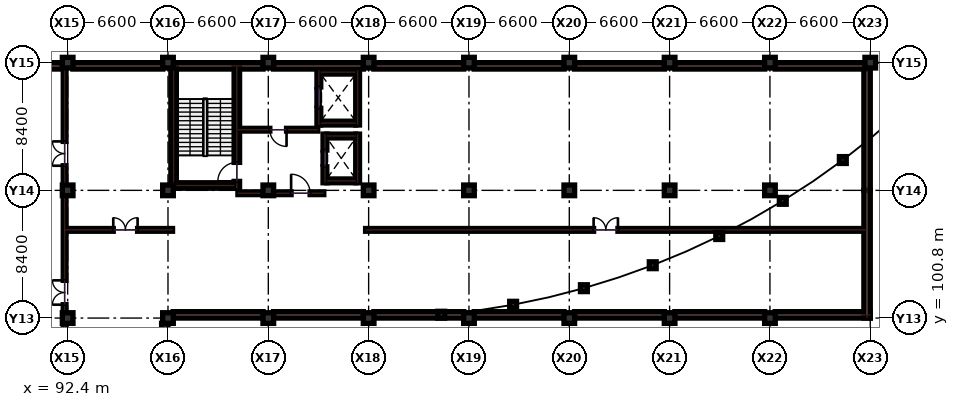
"""IFC4 building model, lengths in metres.
Left out: names, types, materials, properties, quantities, classifications, styles, units other than length and angle.
Written with IfcOpenShell. Run it as: python <this file> out.ifc"""

import sys

from ifc_helpers import new_model, si_unit, direction, frame, frame_2d, origin, origin_2d, place, context, subcontext, project, spatial, rectangle, extrude, element, fill, save


model = new_model("IFC4")
c1 = context("Model", 3, precision=1e-05, world=origin(), true_north=direction((0.0, 1.0)))
c2 = subcontext(c1, "Body", "Model", "MODEL_VIEW")
j1 = project(units=[si_unit("LENGTHUNIT", "METRE"), si_unit("PLANEANGLEUNIT", "RADIAN")], contexts=[c1])
p1 = place(None, origin())
s1 = spatial("IfcSite", under=j1, at=p1, CompositionType="ELEMENT")
p2 = place(p1, origin())
s2 = spatial("IfcBuilding", under=s1, at=p2, CompositionType="ELEMENT")
p3 = place(p2, frame((0.0, 0.0, -4.5)))
s3 = spatial("IfcBuildingStorey", under=s2, at=p3, CompositionType="ELEMENT", Elevation=-4.5)
for number, where, z_axis, x_axis in (
    (1, (92.4, 100.8, 0.0), (0.0, 0.0, 1.0), (1.0, 0.0, 0.0)),
    (2, (92.4, 109.2, 0.0), (0.0, 0.0, 1.0), (1.0, 0.0, 0.0)),
    (3, (92.4, 117.6, 0.0), (0.0, 0.0, 1.0), (1.0, 0.0, 0.0)),
    (4, (99.0, 100.8, 0.0), (0.0, 0.0, 1.0), (1.0, 0.0, 0.0)),
    (5, (99.0, 109.2, 0.0), (0.0, 0.0, 1.0), (1.0, 0.0, 0.0)),
    (6, (99.0, 117.6, 0.0), (0.0, 0.0, 1.0), (1.0, 0.0, 0.0)),
    (7, (105.6, 100.8, 0.0), (0.0, 0.0, 1.0), (1.0, 0.0, 0.0)),
    (8, (105.6, 109.2, 0.0), (0.0, 0.0, 1.0), (1.0, 0.0, 0.0)),
    (9, (105.6, 117.6, 0.0), (0.0, 0.0, 1.0), (1.0, 0.0, 0.0)),
    (10, (112.2, 100.8, 0.0), (0.0, 0.0, 1.0), (1.0, 0.0, 0.0)),
    (11, (112.2, 109.2, 0.0), (0.0, 0.0, 1.0), (1.0, 0.0, 0.0)),
    (12, (112.2, 117.6, 0.0), (0.0, 0.0, 1.0), (1.0, 0.0, 0.0)),
    (13, (118.8, 100.8, 0.0), (0.0, 0.0, 1.0), (1.0, 0.0, 0.0)),
    (14, (118.8, 109.2, 0.0), (0.0, 0.0, 1.0), (1.0, 0.0, 0.0)),
    (15, (118.8, 117.6, 0.0), (0.0, 0.0, 1.0), (1.0, 0.0, 0.0)),
    (16, (125.4, 100.8, 0.0), (0.0, 0.0, 1.0), (1.0, 0.0, 0.0)),
    (17, (125.4, 109.2, 0.0), (0.0, 0.0, 1.0), (1.0, 0.0, 0.0)),
    (18, (125.4, 117.6, 0.0), (0.0, 0.0, 1.0), (1.0, 0.0, 0.0)),
    (19, (132.0, 100.8, 0.0), (0.0, 0.0, 1.0), (1.0, 0.0, 0.0)),
    (20, (132.0, 109.2, 0.0), (0.0, 0.0, 1.0), (1.0, 0.0, 0.0)),
    (21, (132.0, 117.6, 0.0), (0.0, 0.0, 1.0), (1.0, 0.0, 0.0)),
    (22, (138.6, 100.8, 0.0), (0.0, 0.0, 1.0), (1.0, 0.0, 0.0)),
    (23, (138.6, 109.2, 0.0), (0.0, 0.0, 1.0), (1.0, 0.0, 0.0)),
    (24, (138.6, 117.6, 0.0), (0.0, 0.0, 1.0), (1.0, 0.0, 0.0)),
    (25, (145.2, 117.6, 0.0), (0.0, 0.0, 1.0), (1.0, 0.0, 0.0)),
):
    element("IfcColumn", number, at=place(p3, frame(where, z_axis=z_axis, x_axis=x_axis)), inside=s3, PredefinedType="COLUMN", context=c2, shape_type="SweptSolid", body=[
        extrude(rectangle(XDim=0.7, YDim=0.7, at=origin_2d()), origin(), (0.0, 0.0, 1.0), 4.5),
    ])
for number, where, z_axis, x_axis in (
    (26, (116.975, 101.02, 0.0), (0.0, 0.0, 1.0), (1.0, 0.0, 0.0)),
    (27, (121.705, 101.675, 0.0), (0.0, 0.0, 1.0), (1.0, 0.0, 0.0)),
    (28, (126.36, 102.765, 0.0), (0.0, 0.0, 1.0), (1.0, 0.0, 0.0)),
    (29, (130.89, 104.275, 0.0), (0.0, 0.0, 1.0), (1.0, 0.0, 0.0)),
    (30, (135.265, 106.195, 0.0), (0.0, 0.0, 1.0), (1.0, 0.0, 0.0)),
    (31, (139.445, 108.51, 0.0), (0.0, 0.0, 1.0), (1.0, 0.0, 0.0)),
    (32, (143.395, 111.195, 0.0), (0.0, 0.0, 1.0), (1.0, 0.0, 0.0)),
):
    element("IfcColumn", number, at=place(p3, frame(where, z_axis=z_axis, x_axis=x_axis)), inside=s3, PredefinedType="COLUMN", context=c2, shape_type="SweptSolid", body=[
        extrude(rectangle(XDim=0.45, YDim=0.45, at=origin_2d()), origin(), (0.0, 0.0, 1.0), 4.5),
    ])
p4 = place(p3, frame((92.2, 92.82, 0.0), z_axis=(0.0, 0.0, 1.0), x_axis=(0.0, 1.0, 0.0)))
e33 = element("IfcWall", 33, at=p4, inside=s3, PredefinedType="SOLIDWALL", context=c2, shape_type="SweptSolid", body=[
    extrude(rectangle(XDim=7.53, YDim=0.18, at=frame_2d((3.765, 0.0))), origin(), (0.0, 0.0, 1.0), 3.29),
])
p5 = place(p4, frame((5.58, 0.0, 0.0)))
e34 = element("IfcOpeningElement", 34, at=p5, cuts=e33, PredefinedType="OPENING", context=c2, shape_type="SweptSolid", body=[
    extrude(rectangle(XDim=1.6, YDim=2.2, at=frame_2d((0.8, 1.1))), frame((0.0, 0.1, 0.0), z_axis=(0.0, -1.0, 0.0), x_axis=(1.0, 0.0, 0.0)), (0.0, 0.0, 1.0), 0.2),
])
p6 = place(p3, frame((92.2, 101.25, 0.0), z_axis=(0.0, 0.0, 1.0), x_axis=(0.0, 1.0, 0.0)))
e35 = element("IfcWall", 35, at=p6, inside=s3, PredefinedType="SOLIDWALL", context=c2, shape_type="SweptSolid", body=[
    extrude(rectangle(XDim=7.5, YDim=0.18, at=frame_2d((3.75, 0.0))), origin(), (0.0, 0.0, 1.0), 3.29),
])
p7 = place(p6, frame((0.43, 0.0, 0.0)))
e36 = element("IfcOpeningElement", 36, at=p7, cuts=e35, PredefinedType="OPENING", context=c2, shape_type="SweptSolid", body=[
    extrude(rectangle(XDim=1.6, YDim=2.2, at=frame_2d((0.8, 1.1))), frame((0.0, 0.1, 0.0), z_axis=(0.0, -1.0, 0.0), x_axis=(1.0, 0.0, 0.0)), (0.0, 0.0, 1.0), 0.2),
])
p8 = place(p3, frame((92.2, 109.65, 0.0), z_axis=(0.0, 0.0, 1.0), x_axis=(0.0, 1.0, 0.0)))
e37 = element("IfcWall", 37, at=p8, inside=s3, PredefinedType="SOLIDWALL", context=c2, shape_type="SweptSolid", body=[
    extrude(rectangle(XDim=7.65, YDim=0.18, at=frame_2d((3.825, 0.0))), origin(), (0.0, 0.0, 1.0), 3.29),
])
p9 = place(p8, frame((1.17, 0.0, 0.0)))
e38 = element("IfcOpeningElement", 38, at=p9, cuts=e37, PredefinedType="OPENING", context=c2, shape_type="SweptSolid", body=[
    extrude(rectangle(XDim=1.6, YDim=2.2, at=frame_2d((0.8, 1.1))), frame((0.0, 0.1, 0.0), z_axis=(0.0, -1.0, 0.0), x_axis=(1.0, 0.0, 0.0)), (0.0, 0.0, 1.0), 0.2),
])
p10 = place(p3, frame((92.2, 106.6, 0.0), z_axis=(0.0, 0.0, 1.0), x_axis=(1.0, 0.0, 0.0)))
e39 = element("IfcWall", 39, at=p10, inside=s3, PredefinedType="SOLIDWALL", context=c2, shape_type="SweptSolid", body=[
    extrude(rectangle(XDim=7.1, YDim=0.18, at=frame_2d((3.55, 0.0))), origin(), (0.0, 0.0, 1.0), 3.29),
])
p11 = place(p10, frame((3.2, 0.0, 0.0)))
e40 = element("IfcOpeningElement", 40, at=p11, cuts=e39, PredefinedType="OPENING", context=c2, shape_type="SweptSolid", body=[
    extrude(rectangle(XDim=1.6, YDim=2.2, at=frame_2d((0.8, 1.1))), frame((0.0, 0.1, 0.0), z_axis=(0.0, -1.0, 0.0), x_axis=(1.0, 0.0, 0.0)), (0.0, 0.0, 1.0), 0.2),
])
p12 = place(p3, frame((112.0, 106.6, 0.0), z_axis=(0.0, 0.0, 1.0), x_axis=(1.0, 0.0, 0.0)))
e41 = element("IfcWall", 41, at=p12, inside=s3, PredefinedType="SOLIDWALL", context=c2, shape_type="SweptSolid", body=[
    extrude(rectangle(XDim=33.0, YDim=0.18, at=frame_2d((16.5, 0.0))), origin(), (0.0, 0.0, 1.0), 3.29),
])
p13 = place(p12, frame((15.0, 0.0, 0.0)))
e42 = element("IfcOpeningElement", 42, at=p13, cuts=e41, PredefinedType="OPENING", context=c2, shape_type="SweptSolid", body=[
    extrude(rectangle(XDim=1.6, YDim=2.2, at=frame_2d((0.8, 1.1))), frame((0.0, 0.1, 0.0), z_axis=(0.0, -1.0, 0.0), x_axis=(1.0, 0.0, 0.0)), (0.0, 0.0, 1.0), 0.2),
])
p14 = place(p3, frame((92.055, 117.39, 0.0), z_axis=(0.0, 0.0, 1.0), x_axis=(-1.0, 0.0, 0.0)))
e43 = element("IfcWall", 43, at=p14, inside=s3, PredefinedType="SOLIDWALL", context=c2, shape_type="SweptSolid", body=[
    extrude(rectangle(XDim=5.91, YDim=0.42, at=frame_2d((2.955, 0.0))), origin(), (0.0, 0.0, 1.0), 4.14),
])
p15 = place(p3, frame((98.79, 92.62, 0.0), z_axis=(0.0, 0.0, 1.0), x_axis=(0.0, 1.0, 0.0)))
e44 = element("IfcWall", 44, at=p15, inside=s3, PredefinedType="SOLIDWALL", context=c2, shape_type="SweptSolid", body=[
    extrude(rectangle(XDim=7.835, YDim=0.42, at=frame_2d((3.917, 0.0))), origin(), (0.0, 0.0, 1.0), 4.14),
])
for number, where, z_axis, x_axis in (
    (45, (98.655, 117.39, 0.0), (0.0, 0.0, 1.0), (-1.0, 0.0, 0.0)),
    (46, (99.345, 101.01, 0.0), (0.0, 0.0, 1.0), (1.0, 0.0, 0.0)),
):
    element("IfcWall", number, at=place(p3, frame(where, z_axis=z_axis, x_axis=x_axis)), inside=s3, PredefinedType="SOLIDWALL", context=c2, shape_type="SweptSolid", body=[
        extrude(rectangle(XDim=5.91, YDim=0.42, at=frame_2d((2.955, 0.0))), origin(), (0.0, 0.0, 1.0), 4.14),
    ])
p16 = place(p3, frame((105.25, 117.39, 0.0), z_axis=(0.0, 0.0, 1.0), x_axis=(-1.0, 0.0, 0.0)))
e47 = element("IfcWall", 47, at=p16, inside=s3, PredefinedType="SOLIDWALL", context=c2, shape_type="SweptSolid", body=[
    extrude(rectangle(XDim=5.9, YDim=0.42, at=frame_2d((2.95, 0.0))), origin(), (0.0, 0.0, 1.0), 4.14),
])
for number, where, z_axis, x_axis in (
    (48, (105.945, 101.01, 0.0), (0.0, 0.0, 1.0), (1.0, 0.0, 0.0)),
    (49, (111.855, 117.39, 0.0), (0.0, 0.0, 1.0), (-1.0, 0.0, 0.0)),
):
    element("IfcWall", number, at=place(p3, frame(where, z_axis=z_axis, x_axis=x_axis)), inside=s3, PredefinedType="SOLIDWALL", context=c2, shape_type="SweptSolid", body=[
        extrude(rectangle(XDim=5.91, YDim=0.42, at=frame_2d((2.955, 0.0))), origin(), (0.0, 0.0, 1.0), 4.14),
    ])
for number, where, z_axis, x_axis in (
    (50, (112.545, 101.01, 0.0), (0.0, 0.0, 1.0), (1.0, 0.0, 0.0)),
    (51, (118.455, 117.39, 0.0), (0.0, 0.0, 1.0), (-1.0, 0.0, 0.0)),
):
    element("IfcWall", number, at=place(p3, frame(where, z_axis=z_axis, x_axis=x_axis)), inside=s3, PredefinedType="SOLIDWALL", context=c2, shape_type="SweptSolid", body=[
        extrude(rectangle(XDim=5.91, YDim=0.42, at=frame_2d((2.955, 0.0))), origin(), (0.0, 0.0, 1.0), 4.14),
    ])
for number, where, z_axis, x_axis in (
    (52, (119.145, 101.01, 0.0), (0.0, 0.0, 1.0), (1.0, 0.0, 0.0)),
    (53, (125.055, 117.39, 0.0), (0.0, 0.0, 1.0), (-1.0, 0.0, 0.0)),
    (54, (125.745, 101.01, 0.0), (0.0, 0.0, 1.0), (1.0, 0.0, 0.0)),
    (55, (131.655, 117.39, 0.0), (0.0, 0.0, 1.0), (-1.0, 0.0, 0.0)),
    (56, (132.345, 101.01, 0.0), (0.0, 0.0, 1.0), (1.0, 0.0, 0.0)),
    (57, (138.255, 117.39, 0.0), (0.0, 0.0, 1.0), (-1.0, 0.0, 0.0)),
):
    element("IfcWall", number, at=place(p3, frame(where, z_axis=z_axis, x_axis=x_axis)), inside=s3, PredefinedType="SOLIDWALL", context=c2, shape_type="SweptSolid", body=[
        extrude(rectangle(XDim=5.91, YDim=0.42, at=frame_2d((2.955, 0.0))), origin(), (0.0, 0.0, 1.0), 4.14),
    ])
p17 = place(p3, frame((138.945, 101.01, 0.0), z_axis=(0.0, 0.0, 1.0), x_axis=(1.0, 0.0, 0.0)))
e58 = element("IfcWall", 58, at=p17, inside=s3, PredefinedType="SOLIDWALL", context=c2, shape_type="SweptSolid", body=[
    extrude(rectangle(XDim=6.255, YDim=0.42, at=frame_2d((3.127, 0.0))), origin(), (0.0, 0.0, 1.0), 4.14),
])
p18 = place(p3, frame((144.99, 100.8, 0.0), z_axis=(0.0, 0.0, 1.0), x_axis=(0.0, 1.0, 0.0)))
e59 = element("IfcWall", 59, at=p18, inside=s3, PredefinedType="SOLIDWALL", context=c2, shape_type="SweptSolid", body=[
    extrude(rectangle(XDim=8.4, YDim=0.42, at=frame_2d((4.2, 0.0))), origin(), (0.0, 0.0, 1.0), 4.14),
])
p19 = place(p3, frame((144.99, 109.2, 0.0), z_axis=(0.0, 0.0, 1.0), x_axis=(0.0, 1.0, 0.0)))
e60 = element("IfcWall", 60, at=p19, inside=s3, PredefinedType="SOLIDWALL", context=c2, shape_type="SweptSolid", body=[
    extrude(rectangle(XDim=8.055, YDim=0.42, at=frame_2d((4.027, 0.0))), origin(), (0.0, 0.0, 1.0), 4.14),
])
p20 = place(p3, frame((144.855, 117.39, 0.0), z_axis=(0.0, 0.0, 1.0), x_axis=(-1.0, 0.0, 0.0)))
e61 = element("IfcWall", 61, at=p20, inside=s3, PredefinedType="SOLIDWALL", context=c2, shape_type="SweptSolid", body=[
    extrude(rectangle(XDim=5.91, YDim=0.42, at=frame_2d((2.955, 0.0))), origin(), (0.0, 0.0, 1.0), 4.14),
])
p21 = place(p3, frame((99.37, 109.34, 0.0), z_axis=(0.0, 0.0, 1.0), x_axis=(0.0, 1.0, 0.0)))
e62 = element("IfcWall", 62, at=p21, inside=s3, PredefinedType="SHEAR", context=c2, shape_type="SweptSolid", body=[
    extrude(rectangle(XDim=8.05, YDim=0.36, at=frame_2d((4.025, 0.0))), origin(), (0.0, 0.0, 1.0), 4.14),
])
p22 = place(p3, frame((103.53, 109.34, 0.0), z_axis=(0.0, 0.0, 1.0), x_axis=(0.0, 1.0, 0.0)))
e63 = element("IfcWall", 63, at=p22, inside=s3, PredefinedType="SHEAR", context=c2, shape_type="SweptSolid", body=[
    extrude(rectangle(XDim=8.05, YDim=0.36, at=frame_2d((4.025, 0.0))), origin(), (0.0, 0.0, 1.0), 4.14),
])
p23 = place(p22, frame((0.45, 0.0, 0.0)))
e64 = element("IfcOpeningElement", 64, at=p23, cuts=e63, PredefinedType="OPENING", context=c2, shape_type="SweptSolid", body=[
    extrude(rectangle(XDim=1.25, YDim=2.15, at=frame_2d((0.625, 1.075))), frame((0.0, 0.19, 0.0), z_axis=(0.0, -1.0, 0.0), x_axis=(1.0, 0.0, 0.0)), (0.0, 0.0, 1.0), 0.38),
])
p24 = place(p3, frame((99.55, 109.52, 0.0), z_axis=(0.0, 0.0, 1.0), x_axis=(1.0, 0.0, 0.0)))
e65 = element("IfcWall", 65, at=p24, inside=s3, PredefinedType="SHEAR", context=c2, shape_type="SweptSolid", body=[
    extrude(rectangle(XDim=3.8, YDim=0.36, at=frame_2d((1.9, 0.0))), origin(), (0.0, 0.0, 1.0), 4.14),
])
p25 = place(p3, frame((109.325, 109.7, 0.0), z_axis=(0.0, 0.0, 1.0), x_axis=(0.0, 1.0, 0.0)))
e66 = element("IfcWall", 66, at=p25, inside=s3, PredefinedType="SHEAR", context=c2, shape_type="SweptSolid", body=[
    extrude(rectangle(XDim=3.2, YDim=0.25, at=frame_2d((1.6, 0.0))), origin(), (0.0, 0.0, 1.0), 4.14),
])
p26 = place(p25, frame((1.05, 0.0, 0.0)))
e67 = element("IfcOpeningElement", 67, at=p26, cuts=e66, PredefinedType="OPENING", context=c2, shape_type="SweptSolid", body=[
    extrude(rectangle(XDim=1.1, YDim=2.15, at=frame_2d((0.55, 1.075))), frame((0.0, 0.135, 0.0), z_axis=(0.0, -1.0, 0.0), x_axis=(1.0, 0.0, 0.0)), (0.0, 0.0, 1.0), 0.27),
])
p27 = place(p3, frame((111.475, 109.7, 0.0), z_axis=(0.0, 0.0, 1.0), x_axis=(0.0, 1.0, 0.0)))
e68 = element("IfcWall", 68, at=p27, inside=s3, PredefinedType="SHEAR", context=c2, shape_type="SweptSolid", body=[
    extrude(rectangle(XDim=3.2, YDim=0.25, at=frame_2d((1.6, 0.0))), origin(), (0.0, 0.0, 1.0), 4.14),
])
for number, where, z_axis, x_axis in (
    (69, (109.45, 109.825, 0.0), (0.0, 0.0, 1.0), (1.0, 0.0, 0.0)),
    (70, (109.45, 112.775, 0.0), (0.0, 0.0, 1.0), (1.0, 0.0, 0.0)),
):
    element("IfcWall", number, at=place(p3, frame(where, z_axis=z_axis, x_axis=x_axis)), inside=s3, PredefinedType="SHEAR", context=c2, shape_type="SweptSolid", body=[
        extrude(rectangle(XDim=1.9, YDim=0.25, at=frame_2d((0.95, 0.0))), origin(), (0.0, 0.0, 1.0), 4.14),
    ])
p28 = place(p3, frame((108.925, 113.5, 0.0), z_axis=(0.0, 0.0, 1.0), x_axis=(0.0, 1.0, 0.0)))
e71 = element("IfcWall", 71, at=p28, inside=s3, PredefinedType="SHEAR", context=c2, shape_type="SweptSolid", body=[
    extrude(rectangle(XDim=3.6, YDim=0.25, at=frame_2d((1.8, 0.0))), origin(), (0.0, 0.0, 1.0), 4.14),
])
p29 = place(p28, frame((1.1, 0.0, 0.0)))
e72 = element("IfcOpeningElement", 72, at=p29, cuts=e71, PredefinedType="OPENING", context=c2, shape_type="SweptSolid", body=[
    extrude(rectangle(XDim=1.4, YDim=2.2, at=frame_2d((0.7, 1.1))), frame((0.0, 0.135, 0.0), z_axis=(0.0, -1.0, 0.0), x_axis=(1.0, 0.0, 0.0)), (0.0, 0.0, 1.0), 0.27),
])
p30 = place(p3, frame((111.475, 113.5, 0.0), z_axis=(0.0, 0.0, 1.0), x_axis=(0.0, 1.0, 0.0)))
e73 = element("IfcWall", 73, at=p30, inside=s3, PredefinedType="SHEAR", context=c2, shape_type="SweptSolid", body=[
    extrude(rectangle(XDim=3.6, YDim=0.25, at=frame_2d((1.8, 0.0))), origin(), (0.0, 0.0, 1.0), 4.14),
])
for number, where, z_axis, x_axis in (
    (74, (109.05, 113.625, 0.0), (0.0, 0.0, 1.0), (1.0, 0.0, 0.0)),
    (75, (109.05, 116.975, 0.0), (0.0, 0.0, 1.0), (1.0, 0.0, 0.0)),
):
    element("IfcWall", number, at=place(p3, frame(where, z_axis=z_axis, x_axis=x_axis)), inside=s3, PredefinedType="SHEAR", context=c2, shape_type="SweptSolid", body=[
        extrude(rectangle(XDim=2.3, YDim=0.25, at=frame_2d((1.15, 0.0))), origin(), (0.0, 0.0, 1.0), 4.14),
    ])
p31 = place(p3, frame((103.6, 109.01, 0.0), z_axis=(0.0, 0.0, 1.0), x_axis=(1.0, 0.0, 0.0)))
e76 = element("IfcWall", 76, at=p31, inside=s3, PredefinedType="SOLIDWALL", context=c2, shape_type="SweptSolid", body=[
    extrude(rectangle(XDim=1.65, YDim=0.18, at=frame_2d((0.825, 0.0))), origin(), (0.0, 0.0, 1.0), 3.275),
])
p32 = place(p3, frame((105.95, 109.01, 0.0), z_axis=(0.0, 0.0, 1.0), x_axis=(1.0, 0.0, 0.0)))
e77 = element("IfcWall", 77, at=p32, inside=s3, PredefinedType="SOLIDWALL", context=c2, shape_type="SweptSolid", body=[
    extrude(rectangle(XDim=3.3, YDim=0.18, at=frame_2d((1.65, 0.0))), origin(), (0.0, 0.0, 1.0), 3.275),
])
p33 = place(p32, frame((1.15, 0.0, 0.0)))
e78 = element("IfcOpeningElement", 78, at=p33, cuts=e77, PredefinedType="OPENING", context=c2, shape_type="SweptSolid", body=[
    extrude(rectangle(XDim=1.25, YDim=2.15, at=frame_2d((0.625, 1.075))), frame((0.0, 0.1, 0.0), z_axis=(0.0, -1.0, 0.0), x_axis=(1.0, 0.0, 0.0)), (0.0, 0.0, 1.0), 0.2),
])
p34 = place(p3, frame((103.6, 113.19, 0.0), z_axis=(0.0, 0.0, 1.0), x_axis=(1.0, 0.0, 0.0)))
e79 = element("IfcWall", 79, at=p34, inside=s3, PredefinedType="SOLIDWALL", context=c2, shape_type="SweptSolid", body=[
    extrude(rectangle(XDim=5.25, YDim=0.18, at=frame_2d((2.625, 0.0))), origin(), (0.0, 0.0, 1.0), 4.14),
])
p35 = place(p34, frame((2.1, 0.0, 0.0)))
e80 = element("IfcOpeningElement", 80, at=p35, cuts=e79, PredefinedType="OPENING", context=c2, shape_type="SweptSolid", body=[
    extrude(rectangle(XDim=1.1, YDim=2.15, at=frame_2d((0.55, 1.075))), frame((0.0, 0.1, 0.0), z_axis=(0.0, -1.0, 0.0), x_axis=(1.0, 0.0, 0.0)), (0.0, 0.0, 1.0), 0.2),
])
p36 = place(p7, origin())
e81 = element("IfcDoor", 81, at=p36, inside=s3, OperationType="DOUBLE_DOOR_SINGLE_SWING", PredefinedType="DOOR", context=c2, shape_type="SweptSolid", body=[
    extrude(rectangle(XDim=1.6, YDim=2.2, at=frame_2d((0.8, 1.1))), frame((0.0, 0.025, 0.0), z_axis=(0.0, -1.0, 0.0), x_axis=(1.0, 0.0, 0.0)), (0.0, 0.0, 1.0), 0.05),
])
fill(e36, e81)
p37 = place(p9, origin())
e82 = element("IfcDoor", 82, at=p37, inside=s3, OperationType="DOUBLE_DOOR_SINGLE_SWING", PredefinedType="DOOR", context=c2, shape_type="SweptSolid", body=[
    extrude(rectangle(XDim=1.6, YDim=2.2, at=frame_2d((0.8, 1.1))), frame((0.0, 0.025, 0.0), z_axis=(0.0, -1.0, 0.0), x_axis=(1.0, 0.0, 0.0)), (0.0, 0.0, 1.0), 0.05),
])
fill(e38, e82)
p38 = place(p11, origin())
e83 = element("IfcDoor", 83, at=p38, inside=s3, OperationType="DOUBLE_DOOR_SINGLE_SWING", PredefinedType="DOOR", context=c2, shape_type="SweptSolid", body=[
    extrude(rectangle(XDim=1.6, YDim=2.2, at=frame_2d((0.8, 1.1))), frame((0.0, 0.025, 0.0), z_axis=(0.0, -1.0, 0.0), x_axis=(1.0, 0.0, 0.0)), (0.0, 0.0, 1.0), 0.05),
])
fill(e40, e83)
p39 = place(p13, origin())
e84 = element("IfcDoor", 84, at=p39, inside=s3, OperationType="DOUBLE_DOOR_SINGLE_SWING", PredefinedType="DOOR", context=c2, shape_type="SweptSolid", body=[
    extrude(rectangle(XDim=1.6, YDim=2.2, at=frame_2d((0.8, 1.1))), frame((0.0, 0.025, 0.0), z_axis=(0.0, -1.0, 0.0), x_axis=(1.0, 0.0, 0.0)), (0.0, 0.0, 1.0), 0.05),
])
fill(e42, e84)
p40 = place(p23, origin())
e85 = element("IfcDoor", 85, at=p40, inside=s3, OperationType="SINGLE_SWING_LEFT", PredefinedType="DOOR", context=c2, shape_type="SweptSolid", body=[
    extrude(rectangle(XDim=1.25, YDim=2.15, at=frame_2d((0.625, 1.075))), frame((0.0, 0.025, 0.0), z_axis=(0.0, -1.0, 0.0), x_axis=(1.0, 0.0, 0.0)), (0.0, 0.0, 1.0), 0.05),
])
fill(e64, e85)
p41 = place(p26, origin())
e86 = element("IfcDoor", 86, at=p41, inside=s3, OperationType="SLIDING_TO_LEFT", PredefinedType="DOOR", context=c2, shape_type="SweptSolid", body=[
    extrude(rectangle(XDim=1.1, YDim=2.15, at=frame_2d((0.55, 1.075))), frame((0.0, 0.025, 0.0), z_axis=(0.0, -1.0, 0.0), x_axis=(1.0, 0.0, 0.0)), (0.0, 0.0, 1.0), 0.05),
])
fill(e67, e86)
p42 = place(p29, origin())
e87 = element("IfcDoor", 87, at=p42, inside=s3, OperationType="SLIDING_TO_LEFT", PredefinedType="DOOR", context=c2, shape_type="SweptSolid", body=[
    extrude(rectangle(XDim=1.4, YDim=2.2, at=frame_2d((0.7, 1.1))), frame((0.0, 0.025, 0.0), z_axis=(0.0, -1.0, 0.0), x_axis=(1.0, 0.0, 0.0)), (0.0, 0.0, 1.0), 0.05),
])
fill(e72, e87)
p43 = place(p33, origin())
e88 = element("IfcDoor", 88, at=p43, inside=s3, OperationType="SINGLE_SWING_LEFT", PredefinedType="DOOR", context=c2, shape_type="SweptSolid", body=[
    extrude(rectangle(XDim=1.25, YDim=2.15, at=frame_2d((0.625, 1.075))), frame((0.0, 0.025, 0.0), z_axis=(0.0, -1.0, 0.0), x_axis=(1.0, 0.0, 0.0)), (0.0, 0.0, 1.0), 0.05),
])
fill(e78, e88)
p44 = place(p35, frame((1.1, 0.0, 0.0), z_axis=(0.0, 0.0, 1.0), x_axis=(-1.0, 0.0, 0.0)))
e89 = element("IfcDoor", 89, at=p44, inside=s3, OperationType="SINGLE_SWING_RIGHT", PredefinedType="DOOR", context=c2, shape_type="SweptSolid", body=[
    extrude(rectangle(XDim=1.1, YDim=2.15, at=frame_2d((0.55, 1.075))), frame((0.0, 0.025, 0.0), z_axis=(0.0, -1.0, 0.0), x_axis=(1.0, 0.0, 0.0)), (0.0, 0.0, 1.0), 0.05),
])
fill(e80, e89)
save(model, sys.argv[1])
